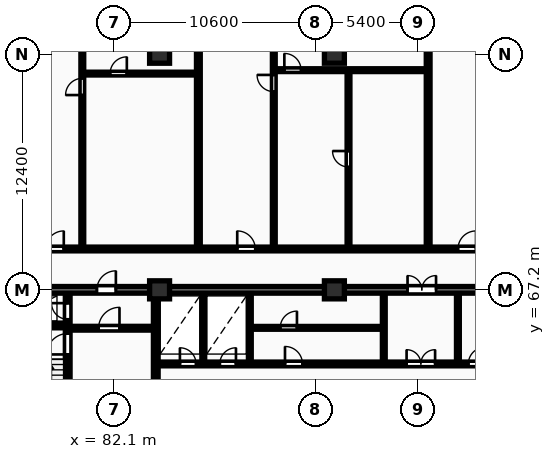
"""IFC4 building model, lengths in metres.
Left out: names, types, materials, properties, quantities, classifications, styles, units other than length and angle.
Written with IfcOpenShell. Run it as: python <this file> out.ifc"""

import sys

from ifc_helpers import new_model, si_unit, direction, frame, frame_2d, origin, origin_2d, place, context, subcontext, project, spatial, rectangle, extrude, element, fill, save


model = new_model("IFC4")
c1 = context("Model", 3, precision=1e-05, world=origin(), true_north=direction((0.0, 1.0)))
c2 = subcontext(c1, "Body", "Model", "MODEL_VIEW")
j1 = project(units=[si_unit("LENGTHUNIT", "METRE"), si_unit("PLANEANGLEUNIT", "RADIAN")], contexts=[c1])
p1 = place(None, origin())
s1 = spatial("IfcSite", under=j1, at=p1, CompositionType="ELEMENT")
p2 = place(p1, origin())
s2 = spatial("IfcBuilding", under=s1, at=p2, CompositionType="ELEMENT")
p3 = place(p2, frame((0.0, 0.0, 24.0)))
s3 = spatial("IfcBuildingStorey", under=s2, at=p3, CompositionType="ELEMENT", Elevation=24.0)
for number, where, z_axis, x_axis in (
    (1, (84.5, 67.2, 0.0), (0.0, 0.0, 1.0), (1.0, 0.0, 0.0)),
    (2, (84.5, 79.6, 0.0), (0.0, 0.0, 1.0), (1.0, 0.0, 0.0)),
    (3, (93.7, 67.2, 0.0), (0.0, 0.0, 1.0), (1.0, 0.0, 0.0)),
    (4, (93.7, 79.6, 0.0), (0.0, 0.0, 1.0), (1.0, 0.0, 0.0)),
):
    element("IfcColumn", number, at=place(p3, frame(where, z_axis=z_axis, x_axis=x_axis)), inside=s3, PredefinedType="COLUMN", context=c2, shape_type="SweptSolid", body=[
        extrude(rectangle(XDim=1.05, YDim=0.95, at=origin_2d()), origin(), (0.0, 0.0, 1.0), 3.25),
    ])
p4 = place(p3, frame((75.95, 67.2, 0.0), z_axis=(0.0, 0.0, 1.0), x_axis=(1.0, 0.0, 0.0)))
e5 = element("IfcWall", 5, at=p4, inside=s3, PredefinedType="SHEAR", context=c2, shape_type="SweptSolid", body=[
    extrude(rectangle(XDim=36.3, YDim=0.35, at=frame_2d((18.15, 0.0))), origin(), (0.0, 0.0, 1.0), 3.25),
])
p5 = place(p4, frame((5.25, 0.0, 0.0)))
e6 = element("IfcOpeningElement", 6, at=p5, cuts=e5, PredefinedType="OPENING", context=c2, shape_type="SweptSolid", body=[
    extrude(rectangle(XDim=1.0, YDim=2.15, at=frame_2d((0.5, 1.075))), frame((0.0, 0.185, 0.0), z_axis=(0.0, -1.0, 0.0), x_axis=(1.0, 0.0, 0.0)), (0.0, 0.0, 1.0), 0.37),
])
p6 = place(p4, frame((21.6, 0.0, 0.0)))
e7 = element("IfcOpeningElement", 7, at=p6, cuts=e5, PredefinedType="OPENING", context=c2, shape_type="SweptSolid", body=[
    extrude(rectangle(XDim=1.5, YDim=2.2, at=frame_2d((0.75, 1.1))), frame((0.0, 0.185, 0.0), z_axis=(0.0, -1.0, 0.0), x_axis=(1.0, 0.0, 0.0)), (0.0, 0.0, 1.0), 0.37),
])
p7 = place(p4, frame((30.45, 0.0, 0.0)))
e8 = element("IfcOpeningElement", 8, at=p7, cuts=e5, PredefinedType="OPENING", context=c2, shape_type="SweptSolid", body=[
    extrude(rectangle(XDim=1.0, YDim=2.15, at=frame_2d((0.5, 1.075))), frame((0.0, 0.185, 0.0), z_axis=(0.0, -1.0, 0.0), x_axis=(1.0, 0.0, 0.0)), (0.0, 0.0, 1.0), 0.37),
])
p8 = place(p3, frame((79.665, 55.4, 0.0), z_axis=(0.0, 0.0, 1.0), x_axis=(0.0, 1.0, 0.0)))
e9 = element("IfcWall", 9, at=p8, inside=s3, PredefinedType="SHEAR", context=c2, shape_type="SweptSolid", body=[
    extrude(rectangle(XDim=11.6, YDim=0.25, at=frame_2d((5.8, 0.0))), origin(), (0.0, 0.0, 1.0), 3.25),
])
p9 = place(p8, frame((0.55, 0.0, 0.0)))
e10 = element("IfcOpeningElement", 10, at=p9, cuts=e9, PredefinedType="OPENING", context=c2, shape_type="SweptSolid", body=[
    extrude(rectangle(XDim=0.85, YDim=2.05, at=frame_2d((0.425, 1.025))), frame((0.0, 0.135, 0.0), z_axis=(0.0, -1.0, 0.0), x_axis=(1.0, 0.0, 0.0)), (0.0, 0.0, 1.0), 0.27),
])
p10 = place(p8, frame((8.4, 0.0, 0.0)))
e11 = element("IfcOpeningElement", 11, at=p10, cuts=e9, PredefinedType="OPENING", context=c2, shape_type="SweptSolid", body=[
    extrude(rectangle(XDim=1.1, YDim=2.1, at=frame_2d((0.55, 1.05))), frame((0.0, 0.135, 0.0), z_axis=(0.0, -1.0, 0.0), x_axis=(1.0, 0.0, 0.0)), (0.0, 0.0, 1.0), 0.27),
])
p11 = place(p8, frame((10.25, 0.0, 0.0)))
e12 = element("IfcOpeningElement", 12, at=p11, cuts=e9, PredefinedType="OPENING", context=c2, shape_type="SweptSolid", body=[
    extrude(rectangle(XDim=0.85, YDim=2.05, at=frame_2d((0.425, 1.025))), frame((0.0, 0.135, 0.0), z_axis=(0.0, -1.0, 0.0), x_axis=(1.0, 0.0, 0.0)), (0.0, 0.0, 1.0), 0.27),
])
p12 = place(p3, frame((76.3, 65.325, 0.0), z_axis=(0.0, 0.0, 1.0), x_axis=(1.0, 0.0, 0.0)))
e13 = element("IfcWall", 13, at=p12, inside=s3, PredefinedType="SHEAR", context=c2, shape_type="SweptSolid", body=[
    extrude(rectangle(XDim=3.24, YDim=0.25, at=frame_2d((1.62, 0.0))), origin(), (0.0, 0.0, 1.0), 3.25),
])
p13 = place(p3, frame((79.79, 65.18, 0.0), z_axis=(0.0, 0.0, 1.0), x_axis=(1.0, 0.0, 0.0)))
e14 = element("IfcWall", 14, at=p13, inside=s3, PredefinedType="PARTITIONING", context=c2, shape_type="SweptSolid", body=[
    extrude(rectangle(XDim=4.39, YDim=0.2, at=frame_2d((2.195, 0.0))), origin(), (0.0, 0.0, 1.0), 2.97),
])
p14 = place(p13, frame((1.5, 0.0, 0.0)))
e15 = element("IfcOpeningElement", 15, at=p14, cuts=e14, PredefinedType="OPENING", context=c2, shape_type="SweptSolid", body=[
    extrude(rectangle(XDim=1.1, YDim=2.1, at=frame_2d((0.55, 1.05))), frame((0.0, 0.11, 0.0), z_axis=(0.0, -1.0, 0.0), x_axis=(1.0, 0.0, 0.0)), (0.0, 0.0, 1.0), 0.22),
])
p15 = place(p3, frame((84.3, 55.4, 0.0), z_axis=(0.0, 0.0, 1.0), x_axis=(0.0, 1.0, 0.0)))
e16 = element("IfcWall", 16, at=p15, inside=s3, PredefinedType="SHEAR", context=c2, shape_type="SweptSolid", body=[
    extrude(rectangle(XDim=11.6, YDim=0.25, at=frame_2d((5.8, 0.0))), origin(), (0.0, 0.0, 1.0), 3.25),
])
p16 = place(p15, frame((5.2, 0.0, 0.0)))
e17 = element("IfcOpeningElement", 17, at=p16, cuts=e16, PredefinedType="OPENING", context=c2, shape_type="SweptSolid", body=[
    extrude(rectangle(XDim=1.1, YDim=2.1, at=frame_2d((0.55, 1.05))), frame((0.0, 0.135, 0.0), z_axis=(0.0, -1.0, 0.0), x_axis=(1.0, 0.0, 0.0)), (0.0, 0.0, 1.0), 0.27),
])
for number, where, z_axis, x_axis in (
    (18, (86.8, 63.4, 0.0), (0.0, 0.0, 1.0), (0.0, 1.0, 0.0)),
    (19, (89.25, 63.4, 0.0), (0.0, 0.0, 1.0), (0.0, 1.0, 0.0)),
):
    element("IfcWall", number, at=place(p3, frame(where, z_axis=z_axis, x_axis=x_axis)), inside=s3, PredefinedType="PARTITIONING", context=c2, shape_type="SweptSolid", body=[
        extrude(rectangle(XDim=3.6, YDim=0.15, at=frame_2d((1.8, 0.0))), origin(), (0.0, 0.0, 1.0), 2.97),
    ])
p17 = place(p3, frame((89.25, 65.2, 0.0), z_axis=(0.0, 0.0, 1.0), x_axis=(1.0, 0.0, 0.0)))
e20 = element("IfcWall", 20, at=p17, inside=s3, PredefinedType="PARTITIONING", context=c2, shape_type="SweptSolid", body=[
    extrude(rectangle(XDim=7.05, YDim=0.15, at=frame_2d((3.525, 0.0))), origin(), (0.0, 0.0, 1.0), 2.97),
])
p18 = place(p17, frame((1.6, 0.0, 0.0)))
e21 = element("IfcOpeningElement", 21, at=p18, cuts=e20, PredefinedType="OPENING", context=c2, shape_type="SweptSolid", body=[
    extrude(rectangle(XDim=0.88, YDim=2.06, at=frame_2d((0.44, 1.03))), frame((0.0, 0.085, 0.0), z_axis=(0.0, -1.0, 0.0), x_axis=(1.0, 0.0, 0.0)), (0.0, 0.0, 1.0), 0.17),
])
for number, where, z_axis, x_axis in (
    (22, (96.3, 63.4, 0.0), (0.0, 0.0, 1.0), (0.0, 1.0, 0.0)),
    (23, (100.2, 63.4, 0.0), (0.0, 0.0, 1.0), (0.0, 1.0, 0.0)),
):
    element("IfcWall", number, at=place(p3, frame(where, z_axis=z_axis, x_axis=x_axis)), inside=s3, PredefinedType="PARTITIONING", context=c2, shape_type="SweptSolid", body=[
        extrude(rectangle(XDim=3.6, YDim=0.15, at=frame_2d((1.8, 0.0))), origin(), (0.0, 0.0, 1.0), 2.97),
    ])
p19 = place(p3, frame((84.42, 63.3, 0.0), z_axis=(0.0, 0.0, 1.0), x_axis=(1.0, 0.0, 0.0)))
e24 = element("IfcWall", 24, at=p19, inside=s3, PredefinedType="PARTITIONING", context=c2, shape_type="SweptSolid", body=[
    extrude(rectangle(XDim=19.83, YDim=0.2, at=frame_2d((9.915, 0.0))), origin(), (0.0, 0.0, 1.0), 2.97),
])
p20 = place(p19, frame((1.15, 0.0, 0.0)))
e25 = element("IfcOpeningElement", 25, at=p20, cuts=e24, PredefinedType="OPENING", context=c2, shape_type="SweptSolid", body=[
    extrude(rectangle(XDim=0.85, YDim=2.05, at=frame_2d((0.425, 1.025))), frame((0.0, 0.11, 0.0), z_axis=(0.0, -1.0, 0.0), x_axis=(1.0, 0.0, 0.0)), (0.0, 0.0, 1.0), 0.22),
])
p21 = place(p19, frame((3.25, 0.0, 0.0)))
e26 = element("IfcOpeningElement", 26, at=p21, cuts=e24, PredefinedType="OPENING", context=c2, shape_type="SweptSolid", body=[
    extrude(rectangle(XDim=0.85, YDim=2.05, at=frame_2d((0.425, 1.025))), frame((0.0, 0.11, 0.0), z_axis=(0.0, -1.0, 0.0), x_axis=(1.0, 0.0, 0.0)), (0.0, 0.0, 1.0), 0.22),
])
p22 = place(p19, frame((13.08, 0.0, 0.0)))
e27 = element("IfcOpeningElement", 27, at=p22, cuts=e24, PredefinedType="OPENING", context=c2, shape_type="SweptSolid", body=[
    extrude(rectangle(XDim=1.5, YDim=2.2, at=frame_2d((0.75, 1.1))), frame((0.0, 0.11, 0.0), z_axis=(0.0, -1.0, 0.0), x_axis=(1.0, 0.0, 0.0)), (0.0, 0.0, 1.0), 0.22),
])
p23 = place(p19, frame((6.68, 0.0, 0.0)))
e28 = element("IfcOpeningElement", 28, at=p23, cuts=e24, PredefinedType="OPENING", context=c2, shape_type="SweptSolid", body=[
    extrude(rectangle(XDim=0.92, YDim=2.08, at=frame_2d((0.46, 1.04))), frame((0.0, 0.11, 0.0), z_axis=(0.0, -1.0, 0.0), x_axis=(1.0, 0.0, 0.0)), (0.0, 0.0, 1.0), 0.22),
])
p24 = place(p19, frame((16.33, 0.0, 0.0)))
e29 = element("IfcOpeningElement", 29, at=p24, cuts=e24, PredefinedType="OPENING", context=c2, shape_type="SweptSolid", body=[
    extrude(rectangle(XDim=0.88, YDim=2.06, at=frame_2d((0.44, 1.03))), frame((0.0, 0.11, 0.0), z_axis=(0.0, -1.0, 0.0), x_axis=(1.0, 0.0, 0.0)), (0.0, 0.0, 1.0), 0.22),
])
p25 = place(p3, frame((86.542, 69.43, 0.0), z_axis=(0.0, 0.0, 1.0), x_axis=(0.0, 1.0, 0.0)))
e30 = element("IfcWall", 30, at=p25, inside=s3, PredefinedType="PARTITIONING", context=c2, shape_type="SweptSolid", body=[
    extrude(rectangle(XDim=29.07, YDim=0.2, at=frame_2d((14.535, 0.0))), origin(), (0.0, 0.0, 1.0), 2.97),
])
p26 = place(p3, frame((80.494, 78.58, 0.0), z_axis=(0.0, 0.0, 1.0), x_axis=(1.0, 0.0, 0.0)))
e31 = element("IfcWall", 31, at=p26, inside=s3, PredefinedType="PARTITIONING", context=c2, shape_type="SweptSolid", body=[
    extrude(rectangle(XDim=5.968, YDim=0.15, at=frame_2d((2.984, 0.0))), origin(), (0.0, 0.0, 1.0), 2.97),
])
p27 = place(p26, frame((1.403, 0.0, 0.0)))
e32 = element("IfcOpeningElement", 32, at=p27, cuts=e31, PredefinedType="OPENING", context=c2, shape_type="SweptSolid", body=[
    extrude(rectangle(XDim=0.88, YDim=2.06, at=frame_2d((0.44, 1.03))), frame((0.0, 0.085, 0.0), z_axis=(0.0, -1.0, 0.0), x_axis=(1.0, 0.0, 0.0)), (0.0, 0.0, 1.0), 0.17),
])
p28 = place(p3, frame((80.434, 69.41, 0.0), z_axis=(0.0, 0.0, 1.0), x_axis=(0.0, 1.0, 0.0)))
e33 = element("IfcWall", 33, at=p28, inside=s3, PredefinedType="PARTITIONING", context=c2, shape_type="SweptSolid", body=[
    extrude(rectangle(XDim=18.7, YDim=0.15, at=frame_2d((9.35, 0.0))), origin(), (0.0, 0.0, 1.0), 2.97),
])
p29 = place(p28, frame((8.04, 0.0, 0.0)))
e34 = element("IfcOpeningElement", 34, at=p29, cuts=e33, PredefinedType="OPENING", context=c2, shape_type="SweptSolid", body=[
    extrude(rectangle(XDim=0.88, YDim=2.06, at=frame_2d((0.44, 1.03))), frame((0.0, 0.085, 0.0), z_axis=(0.0, -1.0, 0.0), x_axis=(1.0, 0.0, 0.0)), (0.0, 0.0, 1.0), 0.17),
])
p30 = place(p3, frame((98.635, 69.43, 0.0), z_axis=(0.0, 0.0, 1.0), x_axis=(0.0, 1.0, 0.0)))
e35 = element("IfcWall", 35, at=p30, inside=s3, PredefinedType="PARTITIONING", context=c2, shape_type="SweptSolid", body=[
    extrude(rectangle(XDim=29.07, YDim=0.2, at=frame_2d((14.535, 0.0))), origin(), (0.0, 0.0, 1.0), 2.97),
])
p31 = place(p3, frame((94.443, 69.41, 0.0), z_axis=(0.0, 0.0, 1.0), x_axis=(0.0, 1.0, 0.0)))
e36 = element("IfcWall", 36, at=p31, inside=s3, PredefinedType="PARTITIONING", context=c2, shape_type="SweptSolid", body=[
    extrude(rectangle(XDim=9.35, YDim=0.15, at=frame_2d((4.675, 0.0))), origin(), (0.0, 0.0, 1.0), 2.97),
])
p32 = place(p31, frame((4.255, 0.0, 0.0)))
e37 = element("IfcOpeningElement", 37, at=p32, cuts=e36, PredefinedType="OPENING", context=c2, shape_type="SweptSolid", body=[
    extrude(rectangle(XDim=0.84, YDim=2.04, at=frame_2d((0.42, 1.02))), frame((0.0, 0.085, 0.0), z_axis=(0.0, -1.0, 0.0), x_axis=(1.0, 0.0, 0.0)), (0.0, 0.0, 1.0), 0.17),
])
p33 = place(p3, frame((90.572, 78.76, 0.0), z_axis=(0.0, 0.0, 1.0), x_axis=(1.0, 0.0, 0.0)))
e38 = element("IfcWall", 38, at=p33, inside=s3, PredefinedType="PARTITIONING", context=c2, shape_type="SweptSolid", body=[
    extrude(rectangle(XDim=7.983, YDim=0.15, at=frame_2d((3.992, 0.0))), origin(), (0.0, 0.0, 1.0), 2.97),
])
p34 = place(p33, frame((0.495, 0.0, 0.0)))
e39 = element("IfcOpeningElement", 39, at=p34, cuts=e38, PredefinedType="OPENING", context=c2, shape_type="SweptSolid", body=[
    extrude(rectangle(XDim=0.88, YDim=2.06, at=frame_2d((0.44, 1.03))), frame((0.0, 0.085, 0.0), z_axis=(0.0, -1.0, 0.0), x_axis=(1.0, 0.0, 0.0)), (0.0, 0.0, 1.0), 0.17),
])
p35 = place(p3, frame((90.511, 69.41, 0.0), z_axis=(0.0, 0.0, 1.0), x_axis=(0.0, 1.0, 0.0)))
e40 = element("IfcWall", 40, at=p35, inside=s3, PredefinedType="PARTITIONING", context=c2, shape_type="SweptSolid", body=[
    extrude(rectangle(XDim=18.7, YDim=0.15, at=frame_2d((9.35, 0.0))), origin(), (0.0, 0.0, 1.0), 2.97),
])
p36 = place(p35, frame((8.22, 0.0, 0.0)))
e41 = element("IfcOpeningElement", 41, at=p36, cuts=e40, PredefinedType="OPENING", context=c2, shape_type="SweptSolid", body=[
    extrude(rectangle(XDim=0.88, YDim=2.06, at=frame_2d((0.44, 1.03))), frame((0.0, 0.085, 0.0), z_axis=(0.0, -1.0, 0.0), x_axis=(1.0, 0.0, 0.0)), (0.0, 0.0, 1.0), 0.17),
])
p37 = place(p3, frame((55.3, 69.35, 0.0), z_axis=(0.0, 0.0, 1.0), x_axis=(1.0, 0.0, 0.0)))
e42 = element("IfcWall", 42, at=p37, inside=s3, PredefinedType="PARTITIONING", context=c2, shape_type="SweptSolid", body=[
    extrude(rectangle(XDim=77.6, YDim=0.2, at=frame_2d((38.8, 0.0))), origin(), (0.0, 0.0, 1.0), 2.97),
])
p38 = place(p37, frame((1.81, 0.0, 0.0)))
e43 = element("IfcOpeningElement", 43, at=p38, cuts=e42, PredefinedType="OPENING", context=c2, shape_type="SweptSolid", body=[
    extrude(rectangle(XDim=0.95, YDim=2.15, at=frame_2d((0.475, 1.075))), frame((0.0, 0.11, 0.0), z_axis=(0.0, -1.0, 0.0), x_axis=(1.0, 0.0, 0.0)), (0.0, 0.0, 1.0), 0.22),
])
p39 = place(p37, frame((10.448, 0.0, 0.0)))
e44 = element("IfcOpeningElement", 44, at=p39, cuts=e42, PredefinedType="OPENING", context=c2, shape_type="SweptSolid", body=[
    extrude(rectangle(XDim=0.95, YDim=2.15, at=frame_2d((0.475, 1.075))), frame((0.0, 0.11, 0.0), z_axis=(0.0, -1.0, 0.0), x_axis=(1.0, 0.0, 0.0)), (0.0, 0.0, 1.0), 0.22),
])
p40 = place(p37, frame((23.208, 0.0, 0.0)))
e45 = element("IfcOpeningElement", 45, at=p40, cuts=e42, PredefinedType="OPENING", context=c2, shape_type="SweptSolid", body=[
    extrude(rectangle(XDim=0.95, YDim=2.15, at=frame_2d((0.475, 1.075))), frame((0.0, 0.11, 0.0), z_axis=(0.0, -1.0, 0.0), x_axis=(1.0, 0.0, 0.0)), (0.0, 0.0, 1.0), 0.22),
])
p41 = place(p37, frame((33.287, 0.0, 0.0)))
e46 = element("IfcOpeningElement", 46, at=p41, cuts=e42, PredefinedType="OPENING", context=c2, shape_type="SweptSolid", body=[
    extrude(rectangle(XDim=0.95, YDim=2.15, at=frame_2d((0.475, 1.075))), frame((0.0, 0.11, 0.0), z_axis=(0.0, -1.0, 0.0), x_axis=(1.0, 0.0, 0.0)), (0.0, 0.0, 1.0), 0.22),
])
p42 = place(p37, frame((44.905, 0.0, 0.0)))
e47 = element("IfcOpeningElement", 47, at=p42, cuts=e42, PredefinedType="OPENING", context=c2, shape_type="SweptSolid", body=[
    extrude(rectangle(XDim=0.95, YDim=2.15, at=frame_2d((0.475, 1.075))), frame((0.0, 0.11, 0.0), z_axis=(0.0, -1.0, 0.0), x_axis=(1.0, 0.0, 0.0)), (0.0, 0.0, 1.0), 0.22),
])
p43 = place(p37, frame((54.119, 0.0, 0.0)))
e48 = element("IfcOpeningElement", 48, at=p43, cuts=e42, PredefinedType="OPENING", context=c2, shape_type="SweptSolid", body=[
    extrude(rectangle(XDim=0.95, YDim=2.15, at=frame_2d((0.475, 1.075))), frame((0.0, 0.11, 0.0), z_axis=(0.0, -1.0, 0.0), x_axis=(1.0, 0.0, 0.0)), (0.0, 0.0, 1.0), 0.22),
])
p44 = place(p37, frame((66.74, 0.0, 0.0)))
e49 = element("IfcOpeningElement", 49, at=p44, cuts=e42, PredefinedType="OPENING", context=c2, shape_type="SweptSolid", body=[
    extrude(rectangle(XDim=0.95, YDim=2.15, at=frame_2d((0.475, 1.075))), frame((0.0, 0.11, 0.0), z_axis=(0.0, -1.0, 0.0), x_axis=(1.0, 0.0, 0.0)), (0.0, 0.0, 1.0), 0.22),
])
p45 = place(p5, origin())
e50 = element("IfcDoor", 50, at=p45, inside=s3, OperationType="SINGLE_SWING_RIGHT", PredefinedType="DOOR", context=c2, shape_type="SweptSolid", body=[
    extrude(rectangle(XDim=1.0, YDim=2.15, at=frame_2d((0.5, 1.075))), frame((0.0, 0.025, 0.0), z_axis=(0.0, -1.0, 0.0), x_axis=(1.0, 0.0, 0.0)), (0.0, 0.0, 1.0), 0.05),
])
fill(e6, e50)
p46 = place(p6, origin())
e51 = element("IfcDoor", 51, at=p46, inside=s3, OperationType="DOUBLE_DOOR_SINGLE_SWING", PredefinedType="DOOR", context=c2, shape_type="SweptSolid", body=[
    extrude(rectangle(XDim=1.5, YDim=2.2, at=frame_2d((0.75, 1.1))), frame((0.0, 0.025, 0.0), z_axis=(0.0, -1.0, 0.0), x_axis=(1.0, 0.0, 0.0)), (0.0, 0.0, 1.0), 0.05),
])
fill(e7, e51)
p47 = place(p10, origin())
e52 = element("IfcDoor", 52, at=p47, inside=s3, OperationType="SINGLE_SWING_LEFT", PredefinedType="DOOR", context=c2, shape_type="SweptSolid", body=[
    extrude(rectangle(XDim=1.1, YDim=2.1, at=frame_2d((0.55, 1.05))), frame((0.0, 0.025, 0.0), z_axis=(0.0, -1.0, 0.0), x_axis=(1.0, 0.0, 0.0)), (0.0, 0.0, 1.0), 0.05),
])
fill(e11, e52)
p48 = place(p11, origin())
e53 = element("IfcDoor", 53, at=p48, inside=s3, OperationType="SINGLE_SWING_RIGHT", PredefinedType="DOOR", context=c2, shape_type="SweptSolid", body=[
    extrude(rectangle(XDim=0.85, YDim=2.05, at=frame_2d((0.425, 1.025))), frame((0.0, 0.025, 0.0), z_axis=(0.0, -1.0, 0.0), x_axis=(1.0, 0.0, 0.0)), (0.0, 0.0, 1.0), 0.05),
])
fill(e12, e53)
p49 = place(p14, origin())
e54 = element("IfcDoor", 54, at=p49, inside=s3, OperationType="SINGLE_SWING_RIGHT", PredefinedType="DOOR", context=c2, shape_type="SweptSolid", body=[
    extrude(rectangle(XDim=1.1, YDim=2.1, at=frame_2d((0.55, 1.05))), frame((0.0, 0.025, 0.0), z_axis=(0.0, -1.0, 0.0), x_axis=(1.0, 0.0, 0.0)), (0.0, 0.0, 1.0), 0.05),
])
fill(e15, e54)
p50 = place(p18, origin())
e55 = element("IfcDoor", 55, at=p50, inside=s3, OperationType="SINGLE_SWING_RIGHT", PredefinedType="DOOR", context=c2, shape_type="SweptSolid", body=[
    extrude(rectangle(XDim=0.88, YDim=2.06, at=frame_2d((0.44, 1.03))), frame((0.0, 0.025, 0.0), z_axis=(0.0, -1.0, 0.0), x_axis=(1.0, 0.0, 0.0)), (0.0, 0.0, 1.0), 0.05),
])
fill(e21, e55)
p51 = place(p20, origin())
e56 = element("IfcDoor", 56, at=p51, inside=s3, OperationType="SINGLE_SWING_LEFT", PredefinedType="DOOR", context=c2, shape_type="SweptSolid", body=[
    extrude(rectangle(XDim=0.85, YDim=2.05, at=frame_2d((0.425, 1.025))), frame((0.0, 0.025, 0.0), z_axis=(0.0, -1.0, 0.0), x_axis=(1.0, 0.0, 0.0)), (0.0, 0.0, 1.0), 0.05),
])
fill(e25, e56)
p52 = place(p21, origin())
e57 = element("IfcDoor", 57, at=p52, inside=s3, OperationType="SINGLE_SWING_RIGHT", PredefinedType="DOOR", context=c2, shape_type="SweptSolid", body=[
    extrude(rectangle(XDim=0.85, YDim=2.05, at=frame_2d((0.425, 1.025))), frame((0.0, 0.025, 0.0), z_axis=(0.0, -1.0, 0.0), x_axis=(1.0, 0.0, 0.0)), (0.0, 0.0, 1.0), 0.05),
])
fill(e26, e57)
p53 = place(p22, origin())
e58 = element("IfcDoor", 58, at=p53, inside=s3, OperationType="DOUBLE_DOOR_SINGLE_SWING", PredefinedType="DOOR", context=c2, shape_type="SweptSolid", body=[
    extrude(rectangle(XDim=1.5, YDim=2.2, at=frame_2d((0.75, 1.1))), frame((0.0, 0.025, 0.0), z_axis=(0.0, -1.0, 0.0), x_axis=(1.0, 0.0, 0.0)), (0.0, 0.0, 1.0), 0.05),
])
fill(e27, e58)
p54 = place(p23, origin())
e59 = element("IfcDoor", 59, at=p54, inside=s3, OperationType="SINGLE_SWING_LEFT", PredefinedType="DOOR", context=c2, shape_type="SweptSolid", body=[
    extrude(rectangle(XDim=0.92, YDim=2.08, at=frame_2d((0.46, 1.04))), frame((0.0, 0.025, 0.0), z_axis=(0.0, -1.0, 0.0), x_axis=(1.0, 0.0, 0.0)), (0.0, 0.0, 1.0), 0.05),
])
fill(e28, e59)
p55 = place(p24, origin())
e60 = element("IfcDoor", 60, at=p55, inside=s3, OperationType="SINGLE_SWING_RIGHT", PredefinedType="DOOR", context=c2, shape_type="SweptSolid", body=[
    extrude(rectangle(XDim=0.88, YDim=2.06, at=frame_2d((0.44, 1.03))), frame((0.0, 0.025, 0.0), z_axis=(0.0, -1.0, 0.0), x_axis=(1.0, 0.0, 0.0)), (0.0, 0.0, 1.0), 0.05),
])
fill(e29, e60)
p56 = place(p27, origin())
e61 = element("IfcDoor", 61, at=p56, inside=s3, OperationType="SINGLE_SWING_RIGHT", PredefinedType="DOOR", context=c2, shape_type="SweptSolid", body=[
    extrude(rectangle(XDim=0.88, YDim=2.06, at=frame_2d((0.44, 1.03))), frame((0.0, 0.025, 0.0), z_axis=(0.0, -1.0, 0.0), x_axis=(1.0, 0.0, 0.0)), (0.0, 0.0, 1.0), 0.05),
])
fill(e32, e61)
p57 = place(p29, origin())
e62 = element("IfcDoor", 62, at=p57, inside=s3, OperationType="SINGLE_SWING_LEFT", PredefinedType="DOOR", context=c2, shape_type="SweptSolid", body=[
    extrude(rectangle(XDim=0.88, YDim=2.06, at=frame_2d((0.44, 1.03))), frame((0.0, 0.025, 0.0), z_axis=(0.0, -1.0, 0.0), x_axis=(1.0, 0.0, 0.0)), (0.0, 0.0, 1.0), 0.05),
])
fill(e34, e62)
p58 = place(p32, origin())
e63 = element("IfcDoor", 63, at=p58, inside=s3, OperationType="SINGLE_SWING_RIGHT", PredefinedType="DOOR", context=c2, shape_type="SweptSolid", body=[
    extrude(rectangle(XDim=0.84, YDim=2.04, at=frame_2d((0.42, 1.02))), frame((0.0, 0.025, 0.0), z_axis=(0.0, -1.0, 0.0), x_axis=(1.0, 0.0, 0.0)), (0.0, 0.0, 1.0), 0.05),
])
fill(e37, e63)
p59 = place(p34, origin())
e64 = element("IfcDoor", 64, at=p59, inside=s3, OperationType="SINGLE_SWING_LEFT", PredefinedType="DOOR", context=c2, shape_type="SweptSolid", body=[
    extrude(rectangle(XDim=0.88, YDim=2.06, at=frame_2d((0.44, 1.03))), frame((0.0, 0.025, 0.0), z_axis=(0.0, -1.0, 0.0), x_axis=(1.0, 0.0, 0.0)), (0.0, 0.0, 1.0), 0.05),
])
fill(e39, e64)
p60 = place(p36, origin())
e65 = element("IfcDoor", 65, at=p60, inside=s3, OperationType="SINGLE_SWING_RIGHT", PredefinedType="DOOR", context=c2, shape_type="SweptSolid", body=[
    extrude(rectangle(XDim=0.88, YDim=2.06, at=frame_2d((0.44, 1.03))), frame((0.0, 0.025, 0.0), z_axis=(0.0, -1.0, 0.0), x_axis=(1.0, 0.0, 0.0)), (0.0, 0.0, 1.0), 0.05),
])
fill(e41, e65)
p61 = place(p40, origin())
e66 = element("IfcDoor", 66, at=p61, inside=s3, OperationType="SINGLE_SWING_RIGHT", PredefinedType="DOOR", context=c2, shape_type="SweptSolid", body=[
    extrude(rectangle(XDim=0.95, YDim=2.15, at=frame_2d((0.475, 1.075))), frame((0.0, 0.025, 0.0), z_axis=(0.0, -1.0, 0.0), x_axis=(1.0, 0.0, 0.0)), (0.0, 0.0, 1.0), 0.05),
])
fill(e45, e66)
p62 = place(p41, origin())
e67 = element("IfcDoor", 67, at=p62, inside=s3, OperationType="SINGLE_SWING_LEFT", PredefinedType="DOOR", context=c2, shape_type="SweptSolid", body=[
    extrude(rectangle(XDim=0.95, YDim=2.15, at=frame_2d((0.475, 1.075))), frame((0.0, 0.025, 0.0), z_axis=(0.0, -1.0, 0.0), x_axis=(1.0, 0.0, 0.0)), (0.0, 0.0, 1.0), 0.05),
])
fill(e46, e67)
p63 = place(p42, origin())
e68 = element("IfcDoor", 68, at=p63, inside=s3, OperationType="SINGLE_SWING_RIGHT", PredefinedType="DOOR", context=c2, shape_type="SweptSolid", body=[
    extrude(rectangle(XDim=0.95, YDim=2.15, at=frame_2d((0.475, 1.075))), frame((0.0, 0.025, 0.0), z_axis=(0.0, -1.0, 0.0), x_axis=(1.0, 0.0, 0.0)), (0.0, 0.0, 1.0), 0.05),
])
fill(e47, e68)
save(model, sys.argv[1])
